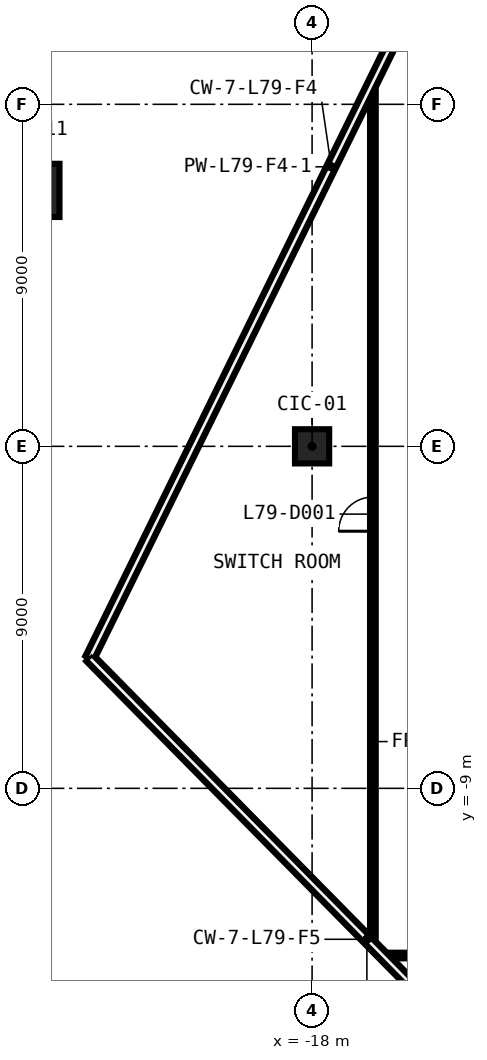
"""IFC4 building model, lengths in metres.
Left out: names, types, materials, properties, quantities, classifications, styles, units other than length and angle.
Written with IfcOpenShell. Run it as: python <this file> out.ifc"""

import sys

from ifc_helpers import new_model, si_unit, direction, frame, frame_2d, origin, origin_2d, place, context, subcontext, project, spatial, rectangle, hollow_rectangle, extrude, element, fill, save


model = new_model("IFC4")
c1 = context("Model", 3, precision=1e-05, world=origin(), true_north=direction((0.0, 1.0)))
c2 = subcontext(c1, "Body", "Model", "MODEL_VIEW")
j1 = project(units=[si_unit("LENGTHUNIT", "METRE"), si_unit("PLANEANGLEUNIT", "RADIAN")], contexts=[c1])
p1 = place(None, origin())
s1 = spatial("IfcSite", under=j1, at=p1, CompositionType="ELEMENT")
p2 = place(p1, origin())
s2 = spatial("IfcBuilding", under=s1, at=p2, CompositionType="ELEMENT")
p3 = place(p2, frame((0.0, 0.0, 367.4)))
s3 = spatial("IfcBuildingStorey", under=s2, at=p3, CompositionType="ELEMENT", Elevation=367.4)
p4 = place(p3, frame((-18.0, 0.0, 0.0), z_axis=(0.0, 0.0, 1.0), x_axis=(1.0, 0.0, 0.0)))
e1 = element("IfcColumn", 1, at=p4, inside=s3, PredefinedType="COLUMN", context=c2, shape_type="SweptSolid", body=[
    extrude(rectangle(XDim=0.9, YDim=0.9, at=origin_2d()), origin(), (0.0, 0.0, 1.0), 3.8),
])
p5 = place(p3, frame((-25.347, 6.735, 0.0), z_axis=(0.0, 0.0, 1.0), x_axis=(1.0, 0.0, 0.0)))
e2 = element("IfcColumn", 2, at=p5, inside=s3, PredefinedType="COLUMN", context=c2, shape_type="SweptSolid", body=[
    extrude(hollow_rectangle(XDim=1.4, YDim=1.4, WallThickness=0.06, at=origin_2d()), origin(), (0.0, 0.0, 1.0), 4.2),
])
p6 = place(p3, frame((14.656, -13.4, 0.0), z_axis=(0.0, 0.0, 1.0), x_axis=(-1.0, 0.0, 0.0)))
e3 = element("IfcWall", 3, at=p6, inside=s3, PredefinedType="PARTITIONING", context=c2, shape_type="SweptSolid", body=[
    extrude(rectangle(XDim=30.765, YDim=0.15, at=frame_2d((15.383, 0.0))), origin(), (0.0, 0.0, 1.0), 3.8),
])
p7 = place(p6, frame((14.933, 0.0, 0.0)))
e4 = element("IfcOpeningElement", 4, at=p7, cuts=e3, PredefinedType="OPENING", context=c2, shape_type="SweptSolid", body=[
    extrude(rectangle(XDim=0.9, YDim=2.1, at=frame_2d((0.45, 1.05))), frame((0.0, 0.085, 0.0), z_axis=(0.0, -1.0, 0.0), x_axis=(1.0, 0.0, 0.0)), (0.0, 0.0, 1.0), 0.17),
])
p8 = place(p3, frame((-16.4, -13.105, 0.0), z_axis=(0.0, 0.0, 1.0), x_axis=(0.0, 1.0, 0.0)))
e5 = element("IfcWall", 5, at=p8, inside=s3, PredefinedType="PARTITIONING", context=c2, shape_type="SweptSolid", body=[
    extrude(rectangle(XDim=22.641, YDim=0.15, at=frame_2d((11.321, 0.0))), origin(), (0.0, 0.0, 1.0), 3.8),
])
p9 = place(p8, frame((10.871, 0.0, 0.0)))
e6 = element("IfcOpeningElement", 6, at=p9, cuts=e5, PredefinedType="OPENING", context=c2, shape_type="SweptSolid", body=[
    extrude(rectangle(XDim=0.9, YDim=2.1, at=frame_2d((0.45, 1.05))), frame((0.0, 0.085, 0.0), z_axis=(0.0, -1.0, 0.0), x_axis=(1.0, 0.0, 0.0)), (0.0, 0.0, 1.0), 0.17),
])
p10 = place(p3, frame((-11.138, 20.28, 0.0), z_axis=(0.0, 0.0, 1.0), x_axis=(-0.441342255748, -0.897338850876, 0.0)))
e7 = element("IfcWall", 7, at=p10, inside=s3, PredefinedType="SOLIDWALL", context=c2, shape_type="SweptSolid", body=[
    extrude(rectangle(XDim=28.805, YDim=0.25, at=frame_2d((14.403, 0.0))), origin(), (0.0, 0.0, 1.0), 3.8),
])
p11 = place(p3, frame((-23.851, -5.568, 0.0), z_axis=(0.0, 0.0, 1.0), x_axis=(0.701718568407, -0.712454244673, 0.0)))
e8 = element("IfcWall", 8, at=p11, inside=s3, PredefinedType="SOLIDWALL", context=c2, shape_type="SweptSolid", body=[
    extrude(rectangle(XDim=20.785, YDim=0.25, at=frame_2d((10.393, 0.0))), origin(), (0.0, 0.0, 1.0), 3.8),
])
p12 = place(p9, origin())
e9 = element("IfcDoor", 9, at=p12, inside=s3, OperationType="SINGLE_SWING_RIGHT", PredefinedType="DOOR", context=c2, shape_type="SweptSolid", body=[
    extrude(rectangle(XDim=0.9, YDim=2.1, at=frame_2d((0.45, 1.05))), frame((0.0, 0.025, 0.0), z_axis=(0.0, -1.0, 0.0), x_axis=(1.0, 0.0, 0.0)), (0.0, 0.0, 1.0), 0.05),
])
fill(e6, e9)
save(model, sys.argv[1])
